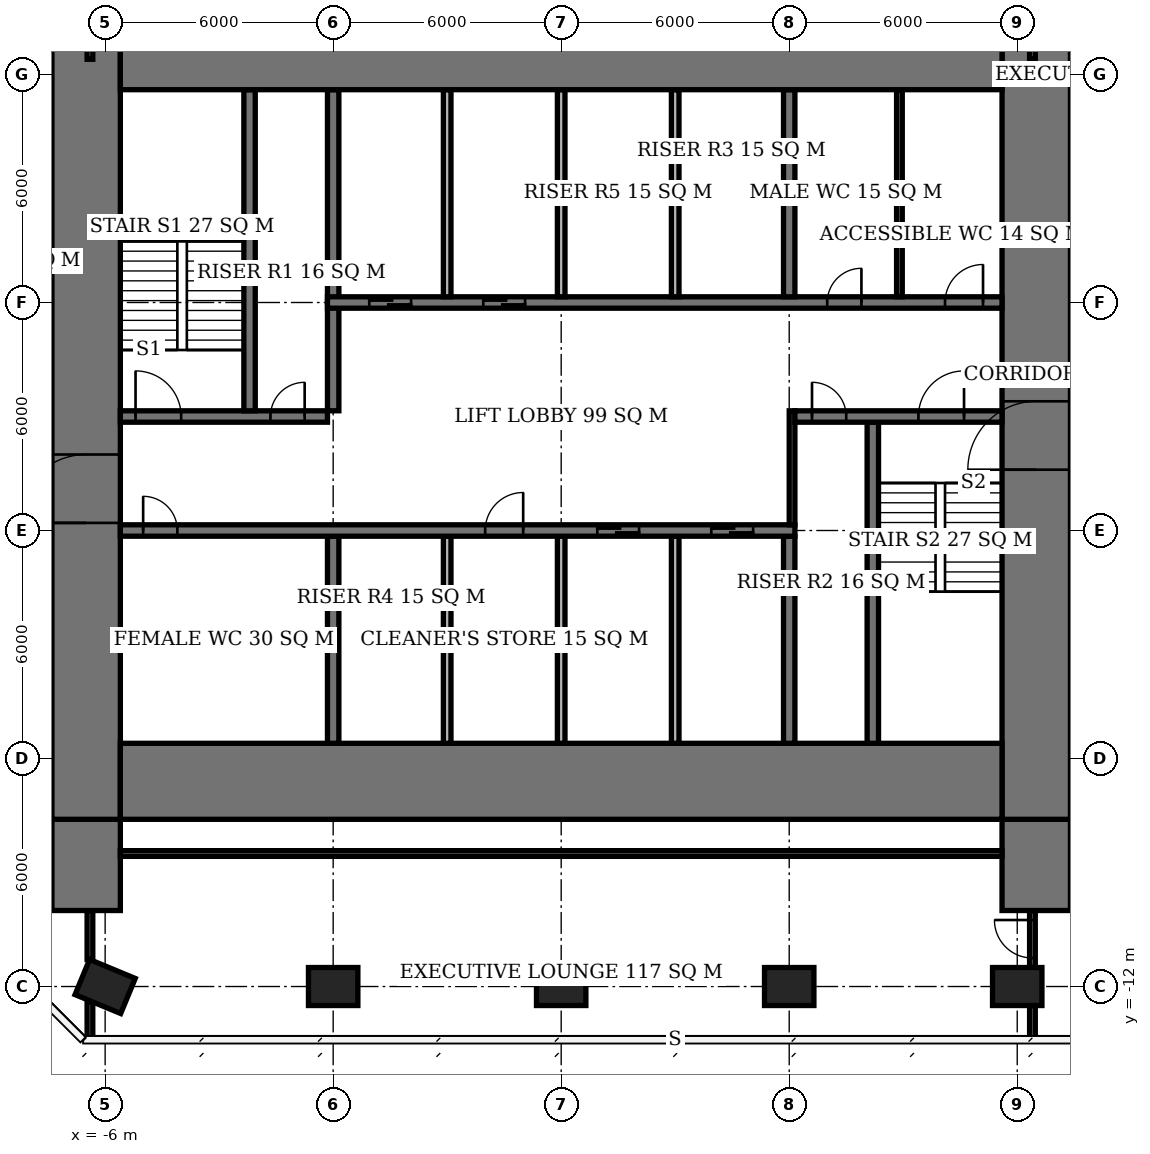
"""IFC4 building model, lengths in metres.
Left out: names, types, materials, properties, quantities, classifications, styles, units other than length and angle.
Written with IfcOpenShell. Run it as: python <this file> out.ifc"""

import sys

from ifc_helpers import new_model, si_unit, direction, frame, frame_2d, origin, origin_2d, place, context, subcontext, project, spatial, rectangle, extrude, element, fill, save


model = new_model("IFC4")
c1 = context("Model", 3, precision=1e-05, world=origin(), true_north=direction((0.0, 1.0)))
c2 = subcontext(c1, "Body", "Model", "MODEL_VIEW")
j1 = project(units=[si_unit("LENGTHUNIT", "METRE"), si_unit("PLANEANGLEUNIT", "RADIAN")], contexts=[c1])
p1 = place(None, origin())
s1 = spatial("IfcSite", under=j1, at=p1, CompositionType="ELEMENT")
p2 = place(p1, origin())
s2 = spatial("IfcBuilding", under=s1, at=p2, CompositionType="ELEMENT")
p3 = place(p2, frame((0.0, 0.0, 256.7)))
s3 = spatial("IfcBuildingStorey", under=s2, at=p3, CompositionType="ELEMENT", Elevation=256.7)
for number, where, z_axis, x_axis in (
    (1, (-6.0, -12.0, 0.0), (0.0, 0.0, 1.0), (-0.924, 0.383, 0.0)),
    (2, (0.0, -12.0, 0.0), (0.0, 0.0, 1.0), (1.0, 0.0, 0.0)),
    (3, (6.0, -12.0, 0.0), (0.0, 0.0, 1.0), (1.0, 0.0, 0.0)),
    (4, (12.0, -12.0, 0.0), (0.0, 0.0, 1.0), (1.0, 0.0, 0.0)),
    (5, (18.0, -12.0, 0.0), (0.0, 0.0, 1.0), (1.0, 0.0, 0.0)),
):
    element("IfcColumn", number, at=place(p3, frame(where, z_axis=z_axis, x_axis=x_axis)), inside=s3, PredefinedType="COLUMN", context=c2, shape_type="SweptSolid", body=[
        extrude(rectangle(XDim=1.3, YDim=1.0, at=origin_2d()), origin(), (0.0, 0.0, 1.0), 3.9),
    ])
for number, where, z_axis, x_axis in (
    (6, (-5.6, -6.6, 0.0), (0.0, 0.0, 1.0), (1.0, 0.0, 0.0)),
    (7, (-5.6, 12.6, 0.0), (0.0, 0.0, 1.0), (1.0, 0.0, 0.0)),
):
    element("IfcWall", number, at=place(p3, frame(where, z_axis=z_axis, x_axis=x_axis)), inside=s3, PredefinedType="SHEAR", context=c2, shape_type="SweptSolid", body=[
        extrude(rectangle(XDim=23.2, YDim=2.0, at=frame_2d((11.6, 0.0))), origin(), (0.0, 0.0, 1.0), 3.9),
    ])
p4 = place(p3, frame((-6.5, -7.6, 0.0), z_axis=(0.0, 0.0, 1.0), x_axis=(0.0, 1.0, 0.0)))
e8 = element("IfcWall", 8, at=p4, inside=s3, PredefinedType="SHEAR", context=c2, shape_type="SweptSolid", body=[
    extrude(rectangle(XDim=21.2, YDim=1.8, at=frame_2d((10.6, 0.0))), origin(), (0.0, 0.0, 1.0), 3.9),
])
p5 = place(p4, frame((7.8, 0.0, 0.0)))
e9 = element("IfcOpeningElement", 9, at=p5, cuts=e8, PredefinedType="OPENING", context=c2, shape_type="SweptSolid", body=[
    extrude(rectangle(XDim=1.8, YDim=2.4, at=frame_2d((0.9, 1.2))), frame((0.0, 0.91, 0.0), z_axis=(0.0, -1.0, 0.0), x_axis=(1.0, 0.0, 0.0)), (0.0, 0.0, 1.0), 1.82),
])
p6 = place(p3, frame((18.5, -7.6, 0.0), z_axis=(0.0, 0.0, 1.0), x_axis=(0.0, 1.0, 0.0)))
e10 = element("IfcWall", 10, at=p6, inside=s3, PredefinedType="SHEAR", context=c2, shape_type="SweptSolid", body=[
    extrude(rectangle(XDim=21.2, YDim=1.8, at=frame_2d((10.6, 0.0))), origin(), (0.0, 0.0, 1.0), 3.9),
])
p7 = place(p6, frame((9.2, 0.0, 0.0)))
e11 = element("IfcOpeningElement", 11, at=p7, cuts=e10, PredefinedType="OPENING", context=c2, shape_type="SweptSolid", body=[
    extrude(rectangle(XDim=1.8, YDim=2.4, at=frame_2d((0.9, 1.2))), frame((0.0, 0.91, 0.0), z_axis=(0.0, -1.0, 0.0), x_axis=(1.0, 0.0, 0.0)), (0.0, 0.0, 1.0), 1.82),
])
for number, where, z_axis, x_axis in (
    (12, (-6.5, -10.0, 0.0), (0.0, 0.0, 1.0), (0.0, 1.0, 0.0)),
    (13, (18.5, -10.0, 0.0), (0.0, 0.0, 1.0), (0.0, 1.0, 0.0)),
):
    element("IfcWall", number, at=place(p3, frame(where, z_axis=z_axis, x_axis=x_axis)), inside=s3, PredefinedType="SHEAR", context=c2, shape_type="SweptSolid", body=[
        extrude(rectangle(XDim=2.4, YDim=1.8, at=frame_2d((1.2, 0.0))), origin(), (0.0, 0.0, 1.0), 3.9),
    ])
p8 = place(p3, frame((-5.6, 0.0, 0.0), z_axis=(0.0, 0.0, 1.0), x_axis=(1.0, 0.0, 0.0)))
e14 = element("IfcWall", 14, at=p8, inside=s3, PredefinedType="SHEAR", context=c2, shape_type="SweptSolid", body=[
    extrude(rectangle(XDim=17.75, YDim=0.3, at=frame_2d((8.875, 0.0))), origin(), (0.0, 0.0, 1.0), 3.9),
])
p9 = place(p8, frame((0.6, 0.0, 0.0)))
e15 = element("IfcOpeningElement", 15, at=p9, cuts=e14, PredefinedType="OPENING", context=c2, shape_type="SweptSolid", body=[
    extrude(rectangle(XDim=0.9, YDim=2.1, at=frame_2d((0.45, 1.05))), frame((0.0, 0.16, 0.0), z_axis=(0.0, -1.0, 0.0), x_axis=(1.0, 0.0, 0.0)), (0.0, 0.0, 1.0), 0.32),
])
p10 = place(p8, frame((9.6, 0.0, 0.0)))
e16 = element("IfcOpeningElement", 16, at=p10, cuts=e14, PredefinedType="OPENING", context=c2, shape_type="SweptSolid", body=[
    extrude(rectangle(XDim=1.0, YDim=2.1, at=frame_2d((0.5, 1.05))), frame((0.0, 0.16, 0.0), z_axis=(0.0, -1.0, 0.0), x_axis=(1.0, 0.0, 0.0)), (0.0, 0.0, 1.0), 0.32),
])
p11 = place(p8, frame((12.55, 0.0, 0.0)))
e17 = element("IfcOpeningElement", 17, at=p11, cuts=e14, PredefinedType="OPENING", context=c2, shape_type="SweptSolid", body=[
    extrude(rectangle(XDim=1.1, YDim=2.1, at=frame_2d((0.55, 1.05))), frame((0.0, 0.16, 0.0), z_axis=(0.0, -1.0, 0.0), x_axis=(1.0, 0.0, 0.0)), (0.0, 0.0, 1.0), 0.32),
])
p12 = place(p8, frame((15.55, 0.0, 0.0)))
e18 = element("IfcOpeningElement", 18, at=p12, cuts=e14, PredefinedType="OPENING", context=c2, shape_type="SweptSolid", body=[
    extrude(rectangle(XDim=1.1, YDim=2.1, at=frame_2d((0.55, 1.05))), frame((0.0, 0.16, 0.0), z_axis=(0.0, -1.0, 0.0), x_axis=(1.0, 0.0, 0.0)), (0.0, 0.0, 1.0), 0.32),
])
p13 = place(p3, frame((-5.6, 3.0, 0.0), z_axis=(0.0, 0.0, 1.0), x_axis=(1.0, 0.0, 0.0)))
e19 = element("IfcWall", 19, at=p13, inside=s3, PredefinedType="SHEAR", context=c2, shape_type="SweptSolid", body=[
    extrude(rectangle(XDim=5.45, YDim=0.3, at=frame_2d((2.725, 0.0))), origin(), (0.0, 0.0, 1.0), 3.9),
])
p14 = place(p13, frame((0.4, 0.0, 0.0)))
e20 = element("IfcOpeningElement", 20, at=p14, cuts=e19, PredefinedType="OPENING", context=c2, shape_type="SweptSolid", body=[
    extrude(rectangle(XDim=1.2, YDim=2.1, at=frame_2d((0.6, 1.05))), frame((0.0, 0.16, 0.0), z_axis=(0.0, -1.0, 0.0), x_axis=(1.0, 0.0, 0.0)), (0.0, 0.0, 1.0), 0.32),
])
p15 = place(p13, frame((3.95, 0.0, 0.0)))
e21 = element("IfcOpeningElement", 21, at=p15, cuts=e19, PredefinedType="OPENING", context=c2, shape_type="SweptSolid", body=[
    extrude(rectangle(XDim=0.9, YDim=2.1, at=frame_2d((0.45, 1.05))), frame((0.0, 0.16, 0.0), z_axis=(0.0, -1.0, 0.0), x_axis=(1.0, 0.0, 0.0)), (0.0, 0.0, 1.0), 0.32),
])
p16 = place(p3, frame((12.15, 3.0, 0.0), z_axis=(0.0, 0.0, 1.0), x_axis=(1.0, 0.0, 0.0)))
e22 = element("IfcWall", 22, at=p16, inside=s3, PredefinedType="SHEAR", context=c2, shape_type="SweptSolid", body=[
    extrude(rectangle(XDim=5.45, YDim=0.3, at=frame_2d((2.725, 0.0))), origin(), (0.0, 0.0, 1.0), 3.9),
])
p17 = place(p16, frame((3.25, 0.0, 0.0)))
e23 = element("IfcOpeningElement", 23, at=p17, cuts=e22, PredefinedType="OPENING", context=c2, shape_type="SweptSolid", body=[
    extrude(rectangle(XDim=1.2, YDim=2.1, at=frame_2d((0.6, 1.05))), frame((0.0, 0.16, 0.0), z_axis=(0.0, -1.0, 0.0), x_axis=(1.0, 0.0, 0.0)), (0.0, 0.0, 1.0), 0.32),
])
p18 = place(p16, frame((0.45, 0.0, 0.0)))
e24 = element("IfcOpeningElement", 24, at=p18, cuts=e22, PredefinedType="OPENING", context=c2, shape_type="SweptSolid", body=[
    extrude(rectangle(XDim=0.9, YDim=2.1, at=frame_2d((0.45, 1.05))), frame((0.0, 0.16, 0.0), z_axis=(0.0, -1.0, 0.0), x_axis=(1.0, 0.0, 0.0)), (0.0, 0.0, 1.0), 0.32),
])
p19 = place(p3, frame((-0.15, 6.0, 0.0), z_axis=(0.0, 0.0, 1.0), x_axis=(1.0, 0.0, 0.0)))
e25 = element("IfcWall", 25, at=p19, inside=s3, PredefinedType="SHEAR", context=c2, shape_type="SweptSolid", body=[
    extrude(rectangle(XDim=17.75, YDim=0.3, at=frame_2d((8.875, 0.0))), origin(), (0.0, 0.0, 1.0), 3.9),
])
p20 = place(p19, frame((13.15, 0.0, 0.0)))
e26 = element("IfcOpeningElement", 26, at=p20, cuts=e25, PredefinedType="OPENING", context=c2, shape_type="SweptSolid", body=[
    extrude(rectangle(XDim=0.9, YDim=2.1, at=frame_2d((0.45, 1.05))), frame((0.0, 0.16, 0.0), z_axis=(0.0, -1.0, 0.0), x_axis=(1.0, 0.0, 0.0)), (0.0, 0.0, 1.0), 0.32),
])
p21 = place(p19, frame((16.25, 0.0, 0.0)))
e27 = element("IfcOpeningElement", 27, at=p21, cuts=e25, PredefinedType="OPENING", context=c2, shape_type="SweptSolid", body=[
    extrude(rectangle(XDim=1.0, YDim=2.1, at=frame_2d((0.5, 1.05))), frame((0.0, 0.16, 0.0), z_axis=(0.0, -1.0, 0.0), x_axis=(1.0, 0.0, 0.0)), (0.0, 0.0, 1.0), 0.32),
])
p22 = place(p19, frame((1.1, 0.0, 0.0)))
e28 = element("IfcOpeningElement", 28, at=p22, cuts=e25, PredefinedType="OPENING", context=c2, shape_type="SweptSolid", body=[
    extrude(rectangle(XDim=1.1, YDim=2.1, at=frame_2d((0.55, 1.05))), frame((0.0, 0.16, 0.0), z_axis=(0.0, -1.0, 0.0), x_axis=(1.0, 0.0, 0.0)), (0.0, 0.0, 1.0), 0.32),
])
p23 = place(p19, frame((4.1, 0.0, 0.0)))
e29 = element("IfcOpeningElement", 29, at=p23, cuts=e25, PredefinedType="OPENING", context=c2, shape_type="SweptSolid", body=[
    extrude(rectangle(XDim=1.1, YDim=2.1, at=frame_2d((0.55, 1.05))), frame((0.0, 0.16, 0.0), z_axis=(0.0, -1.0, 0.0), x_axis=(1.0, 0.0, 0.0)), (0.0, 0.0, 1.0), 0.32),
])
p24 = place(p3, frame((0.0, -5.6, 0.0), z_axis=(0.0, 0.0, 1.0), x_axis=(0.0, 1.0, 0.0)))
e30 = element("IfcWall", 30, at=p24, inside=s3, PredefinedType="SHEAR", context=c2, shape_type="SweptSolid", body=[
    extrude(rectangle(XDim=5.45, YDim=0.3, at=frame_2d((2.725, 0.0))), origin(), (0.0, 0.0, 1.0), 3.9),
])
p25 = place(p3, frame((0.0, 3.15, 0.0), z_axis=(0.0, 0.0, 1.0), x_axis=(0.0, 1.0, 0.0)))
e31 = element("IfcWall", 31, at=p25, inside=s3, PredefinedType="SHEAR", context=c2, shape_type="SweptSolid", body=[
    extrude(rectangle(XDim=8.45, YDim=0.3, at=frame_2d((4.225, 0.0))), origin(), (0.0, 0.0, 1.0), 3.9),
])
for number, where, z_axis, x_axis in (
    (32, (12.0, -5.6, 0.0), (0.0, 0.0, 1.0), (0.0, 1.0, 0.0)),
    (33, (12.0, 6.15, 0.0), (0.0, 0.0, 1.0), (0.0, 1.0, 0.0)),
):
    element("IfcWall", number, at=place(p3, frame(where, z_axis=z_axis, x_axis=x_axis)), inside=s3, PredefinedType="SHEAR", context=c2, shape_type="SweptSolid", body=[
        extrude(rectangle(XDim=5.45, YDim=0.3, at=frame_2d((2.725, 0.0))), origin(), (0.0, 0.0, 1.0), 3.9),
    ])
for number, where, z_axis, x_axis in (
    (34, (-2.2, 3.15, 0.0), (0.0, 0.0, 1.0), (0.0, 1.0, 0.0)),
    (35, (14.2, -5.6, 0.0), (0.0, 0.0, 1.0), (0.0, 1.0, 0.0)),
):
    element("IfcWall", number, at=place(p3, frame(where, z_axis=z_axis, x_axis=x_axis)), inside=s3, PredefinedType="SHEAR", context=c2, shape_type="SweptSolid", body=[
        extrude(rectangle(XDim=8.45, YDim=0.3, at=frame_2d((4.225, 0.0))), origin(), (0.0, 0.0, 1.0), 3.9),
    ])
for number, where, z_axis, x_axis in (
    (36, (3.0, 6.15, 0.0), (0.0, 0.0, 1.0), (0.0, 1.0, 0.0)),
    (37, (6.0, 6.15, 0.0), (0.0, 0.0, 1.0), (0.0, 1.0, 0.0)),
    (38, (9.0, 6.15, 0.0), (0.0, 0.0, 1.0), (0.0, 1.0, 0.0)),
    (39, (3.0, -5.6, 0.0), (0.0, 0.0, 1.0), (0.0, 1.0, 0.0)),
    (40, (6.0, -5.6, 0.0), (0.0, 0.0, 1.0), (0.0, 1.0, 0.0)),
    (41, (9.0, -5.6, 0.0), (0.0, 0.0, 1.0), (0.0, 1.0, 0.0)),
):
    element("IfcWall", number, at=place(p3, frame(where, z_axis=z_axis, x_axis=x_axis)), inside=s3, PredefinedType="SOLIDWALL", context=c2, shape_type="SweptSolid", body=[
        extrude(rectangle(XDim=5.45, YDim=0.2, at=frame_2d((2.725, 0.0))), origin(), (0.0, 0.0, 1.0), 3.9),
    ])
p26 = place(p3, frame((14.9, 6.15, 0.0), z_axis=(0.0, 0.0, 1.0), x_axis=(0.0, 1.0, 0.0)))
e42 = element("IfcWall", 42, at=p26, inside=s3, PredefinedType="PLUMBINGWALL", context=c2, shape_type="SweptSolid", body=[
    extrude(rectangle(XDim=5.45, YDim=0.15, at=frame_2d((2.725, 0.0))), origin(), (0.0, 0.0, 1.0), 3.65),
])
p27 = place(p3, frame((-6.4, -13.375, 0.0), z_axis=(0.0, 0.0, 1.0), x_axis=(0.0, 1.0, 0.0)))
e43 = element("IfcWall", 43, at=p27, inside=s3, PredefinedType="PARTITIONING", context=c2, shape_type="SweptSolid", body=[
    extrude(rectangle(XDim=0.969, YDim=0.15, at=frame_2d((0.484, 0.0))), origin(), (0.0, 0.0, 1.0), 3.65),
])
p28 = place(p3, frame((-6.4, -11.289, 0.0), z_axis=(0.0, 0.0, 1.0), x_axis=(0.0, 1.0, 0.0)))
e44 = element("IfcWall", 44, at=p28, inside=s3, PredefinedType="PARTITIONING", context=c2, shape_type="SweptSolid", body=[
    extrude(rectangle(XDim=1.289, YDim=0.15, at=frame_2d((0.645, 0.0))), origin(), (0.0, 0.0, 1.0), 3.65),
])
p29 = place(p3, frame((-6.4, 12.4, 0.0), z_axis=(0.0, 0.0, 1.0), x_axis=(0.0, 1.0, 0.0)))
e45 = element("IfcWall", 45, at=p29, inside=s3, PredefinedType="PARTITIONING", context=c2, shape_type="SweptSolid", body=[
    extrude(rectangle(XDim=1.2, YDim=0.15, at=frame_2d((0.6, 0.0))), origin(), (0.0, 0.0, 1.0), 3.65),
])
p30 = place(p3, frame((-5.6, -8.5, 0.0), z_axis=(0.0, 0.0, 1.0), x_axis=(1.0, 0.0, 0.0)))
e46 = element("IfcWall", 46, at=p30, inside=s3, PredefinedType="PARTITIONING", context=c2, shape_type="SweptSolid", body=[
    extrude(rectangle(XDim=23.2, YDim=0.15, at=frame_2d((11.6, 0.0))), origin(), (0.0, 0.0, 1.0), 3.65),
])
p31 = place(p3, frame((-1.5, 12.4, 0.0), z_axis=(0.0, 0.0, 1.0), x_axis=(0.0, 1.0, 0.0)))
e47 = element("IfcWall", 47, at=p31, inside=s3, PredefinedType="PARTITIONING", context=c2, shape_type="SweptSolid", body=[
    extrude(rectangle(XDim=12.975, YDim=0.15, at=frame_2d((6.488, 0.0))), origin(), (0.0, 0.0, 1.0), 3.65),
])
p32 = place(p3, frame((18.4, -13.35, 0.0), z_axis=(0.0, 0.0, 1.0), x_axis=(0.0, 1.0, 0.0)))
e48 = element("IfcWall", 48, at=p32, inside=s3, PredefinedType="PARTITIONING", context=c2, shape_type="SweptSolid", body=[
    extrude(rectangle(XDim=0.85, YDim=0.15, at=frame_2d((0.425, 0.0))), origin(), (0.0, 0.0, 1.0), 3.65),
])
p33 = place(p3, frame((18.4, -11.5, 0.0), z_axis=(0.0, 0.0, 1.0), x_axis=(0.0, 1.0, 0.0)))
e49 = element("IfcWall", 49, at=p33, inside=s3, PredefinedType="PARTITIONING", context=c2, shape_type="SweptSolid", body=[
    extrude(rectangle(XDim=1.5, YDim=0.15, at=frame_2d((0.75, 0.0))), origin(), (0.0, 0.0, 1.0), 3.65),
])
p34 = place(p33, frame((0.25, 0.0, 0.0)))
e50 = element("IfcOpeningElement", 50, at=p34, cuts=e49, PredefinedType="OPENING", context=c2, shape_type="SweptSolid", body=[
    extrude(rectangle(XDim=1.0, YDim=2.1, at=frame_2d((0.5, 1.05))), frame((0.0, 0.085, 0.0), z_axis=(0.0, -1.0, 0.0), x_axis=(1.0, 0.0, 0.0)), (0.0, 0.0, 1.0), 0.17),
])
p35 = place(p3, frame((18.4, 12.4, 0.0), z_axis=(0.0, 0.0, 1.0), x_axis=(0.0, 1.0, 0.0)))
e51 = element("IfcWall", 51, at=p35, inside=s3, PredefinedType="PARTITIONING", context=c2, shape_type="SweptSolid", body=[
    extrude(rectangle(XDim=1.2, YDim=0.15, at=frame_2d((0.6, 0.0))), origin(), (0.0, 0.0, 1.0), 3.65),
])
p36 = place(p3, frame((12.075, 0.15, 0.0), z_axis=(0.0, 0.0, 1.0), x_axis=(0.0, 1.0, 0.0)))
e52 = element("IfcWall", 52, at=p36, inside=s3, PredefinedType="PARTITIONING", context=c2, shape_type="SweptSolid", body=[
    extrude(rectangle(XDim=3.0, YDim=0.15, at=frame_2d((1.5, 0.0))), origin(), (0.0, 0.0, 1.0), 3.65),
])
p37 = place(p5, origin())
e53 = element("IfcDoor", 53, at=p37, inside=s3, OperationType="DOUBLE_DOOR_SINGLE_SWING", PredefinedType="DOOR", context=c2, shape_type="SweptSolid", body=[
    extrude(rectangle(XDim=1.8, YDim=2.4, at=frame_2d((0.9, 1.2))), frame((0.0, 0.025, 0.0), z_axis=(0.0, -1.0, 0.0), x_axis=(1.0, 0.0, 0.0)), (0.0, 0.0, 1.0), 0.05),
])
fill(e9, e53)
p38 = place(p7, origin())
e54 = element("IfcDoor", 54, at=p38, inside=s3, OperationType="DOUBLE_DOOR_SINGLE_SWING", PredefinedType="DOOR", context=c2, shape_type="SweptSolid", body=[
    extrude(rectangle(XDim=1.8, YDim=2.4, at=frame_2d((0.9, 1.2))), frame((0.0, 0.025, 0.0), z_axis=(0.0, -1.0, 0.0), x_axis=(1.0, 0.0, 0.0)), (0.0, 0.0, 1.0), 0.05),
])
fill(e11, e54)
p39 = place(p14, origin())
e55 = element("IfcDoor", 55, at=p39, inside=s3, OperationType="SINGLE_SWING_LEFT", PredefinedType="DOOR", context=c2, shape_type="SweptSolid", body=[
    extrude(rectangle(XDim=1.2, YDim=2.1, at=frame_2d((0.6, 1.05))), frame((0.0, 0.025, 0.0), z_axis=(0.0, -1.0, 0.0), x_axis=(1.0, 0.0, 0.0)), (0.0, 0.0, 1.0), 0.05),
])
fill(e20, e55)
p40 = place(p15, origin())
e56 = element("IfcDoor", 56, at=p40, inside=s3, OperationType="SINGLE_SWING_RIGHT", PredefinedType="DOOR", context=c2, shape_type="SweptSolid", body=[
    extrude(rectangle(XDim=0.9, YDim=2.1, at=frame_2d((0.45, 1.05))), frame((0.0, 0.025, 0.0), z_axis=(0.0, -1.0, 0.0), x_axis=(1.0, 0.0, 0.0)), (0.0, 0.0, 1.0), 0.05),
])
fill(e21, e56)
p41 = place(p17, origin())
e57 = element("IfcDoor", 57, at=p41, inside=s3, OperationType="SINGLE_SWING_RIGHT", PredefinedType="DOOR", context=c2, shape_type="SweptSolid", body=[
    extrude(rectangle(XDim=1.2, YDim=2.1, at=frame_2d((0.6, 1.05))), frame((0.0, 0.025, 0.0), z_axis=(0.0, -1.0, 0.0), x_axis=(1.0, 0.0, 0.0)), (0.0, 0.0, 1.0), 0.05),
])
fill(e23, e57)
p42 = place(p18, origin())
e58 = element("IfcDoor", 58, at=p42, inside=s3, OperationType="SINGLE_SWING_LEFT", PredefinedType="DOOR", context=c2, shape_type="SweptSolid", body=[
    extrude(rectangle(XDim=0.9, YDim=2.1, at=frame_2d((0.45, 1.05))), frame((0.0, 0.025, 0.0), z_axis=(0.0, -1.0, 0.0), x_axis=(1.0, 0.0, 0.0)), (0.0, 0.0, 1.0), 0.05),
])
fill(e24, e58)
p43 = place(p9, origin())
e59 = element("IfcDoor", 59, at=p43, inside=s3, OperationType="SINGLE_SWING_LEFT", PredefinedType="DOOR", context=c2, shape_type="SweptSolid", body=[
    extrude(rectangle(XDim=0.9, YDim=2.1, at=frame_2d((0.45, 1.05))), frame((0.0, 0.025, 0.0), z_axis=(0.0, -1.0, 0.0), x_axis=(1.0, 0.0, 0.0)), (0.0, 0.0, 1.0), 0.05),
])
fill(e15, e59)
p44 = place(p20, origin())
e60 = element("IfcDoor", 60, at=p44, inside=s3, OperationType="SINGLE_SWING_RIGHT", PredefinedType="DOOR", context=c2, shape_type="SweptSolid", body=[
    extrude(rectangle(XDim=0.9, YDim=2.1, at=frame_2d((0.45, 1.05))), frame((0.0, 0.025, 0.0), z_axis=(0.0, -1.0, 0.0), x_axis=(1.0, 0.0, 0.0)), (0.0, 0.0, 1.0), 0.05),
])
fill(e26, e60)
p45 = place(p21, origin())
e61 = element("IfcDoor", 61, at=p45, inside=s3, OperationType="SINGLE_SWING_RIGHT", PredefinedType="DOOR", context=c2, shape_type="SweptSolid", body=[
    extrude(rectangle(XDim=1.0, YDim=2.1, at=frame_2d((0.5, 1.05))), frame((0.0, 0.025, 0.0), z_axis=(0.0, -1.0, 0.0), x_axis=(1.0, 0.0, 0.0)), (0.0, 0.0, 1.0), 0.05),
])
fill(e27, e61)
p46 = place(p10, origin())
e62 = element("IfcDoor", 62, at=p46, inside=s3, OperationType="SINGLE_SWING_RIGHT", PredefinedType="DOOR", context=c2, shape_type="SweptSolid", body=[
    extrude(rectangle(XDim=1.0, YDim=2.1, at=frame_2d((0.5, 1.05))), frame((0.0, 0.025, 0.0), z_axis=(0.0, -1.0, 0.0), x_axis=(1.0, 0.0, 0.0)), (0.0, 0.0, 1.0), 0.05),
])
fill(e16, e62)
p47 = place(p22, origin())
e63 = element("IfcDoor", 63, at=p47, inside=s3, OperationType="DOUBLE_DOOR_SLIDING", PredefinedType="USERDEFINED", context=c2, shape_type="SweptSolid", body=[
    extrude(rectangle(XDim=1.1, YDim=2.1, at=frame_2d((0.55, 1.05))), frame((0.0, 0.025, 0.0), z_axis=(0.0, -1.0, 0.0), x_axis=(1.0, 0.0, 0.0)), (0.0, 0.0, 1.0), 0.05),
])
fill(e28, e63)
p48 = place(p23, origin())
e64 = element("IfcDoor", 64, at=p48, inside=s3, OperationType="DOUBLE_DOOR_SLIDING", PredefinedType="USERDEFINED", context=c2, shape_type="SweptSolid", body=[
    extrude(rectangle(XDim=1.1, YDim=2.1, at=frame_2d((0.55, 1.05))), frame((0.0, 0.025, 0.0), z_axis=(0.0, -1.0, 0.0), x_axis=(1.0, 0.0, 0.0)), (0.0, 0.0, 1.0), 0.05),
])
fill(e29, e64)
p49 = place(p11, origin())
e65 = element("IfcDoor", 65, at=p49, inside=s3, OperationType="DOUBLE_DOOR_SLIDING", PredefinedType="USERDEFINED", context=c2, shape_type="SweptSolid", body=[
    extrude(rectangle(XDim=1.1, YDim=2.1, at=frame_2d((0.55, 1.05))), frame((0.0, 0.025, 0.0), z_axis=(0.0, -1.0, 0.0), x_axis=(1.0, 0.0, 0.0)), (0.0, 0.0, 1.0), 0.05),
])
fill(e17, e65)
p50 = place(p12, origin())
e66 = element("IfcDoor", 66, at=p50, inside=s3, OperationType="DOUBLE_DOOR_SLIDING", PredefinedType="USERDEFINED", context=c2, shape_type="SweptSolid", body=[
    extrude(rectangle(XDim=1.1, YDim=2.1, at=frame_2d((0.55, 1.05))), frame((0.0, 0.025, 0.0), z_axis=(0.0, -1.0, 0.0), x_axis=(1.0, 0.0, 0.0)), (0.0, 0.0, 1.0), 0.05),
])
fill(e18, e66)
p51 = place(p34, origin())
e67 = element("IfcDoor", 67, at=p51, inside=s3, OperationType="SINGLE_SWING_RIGHT", PredefinedType="DOOR", context=c2, shape_type="SweptSolid", body=[
    extrude(rectangle(XDim=1.0, YDim=2.1, at=frame_2d((0.5, 1.05))), frame((0.0, 0.025, 0.0), z_axis=(0.0, -1.0, 0.0), x_axis=(1.0, 0.0, 0.0)), (0.0, 0.0, 1.0), 0.05),
])
fill(e50, e67)
save(model, sys.argv[1])
